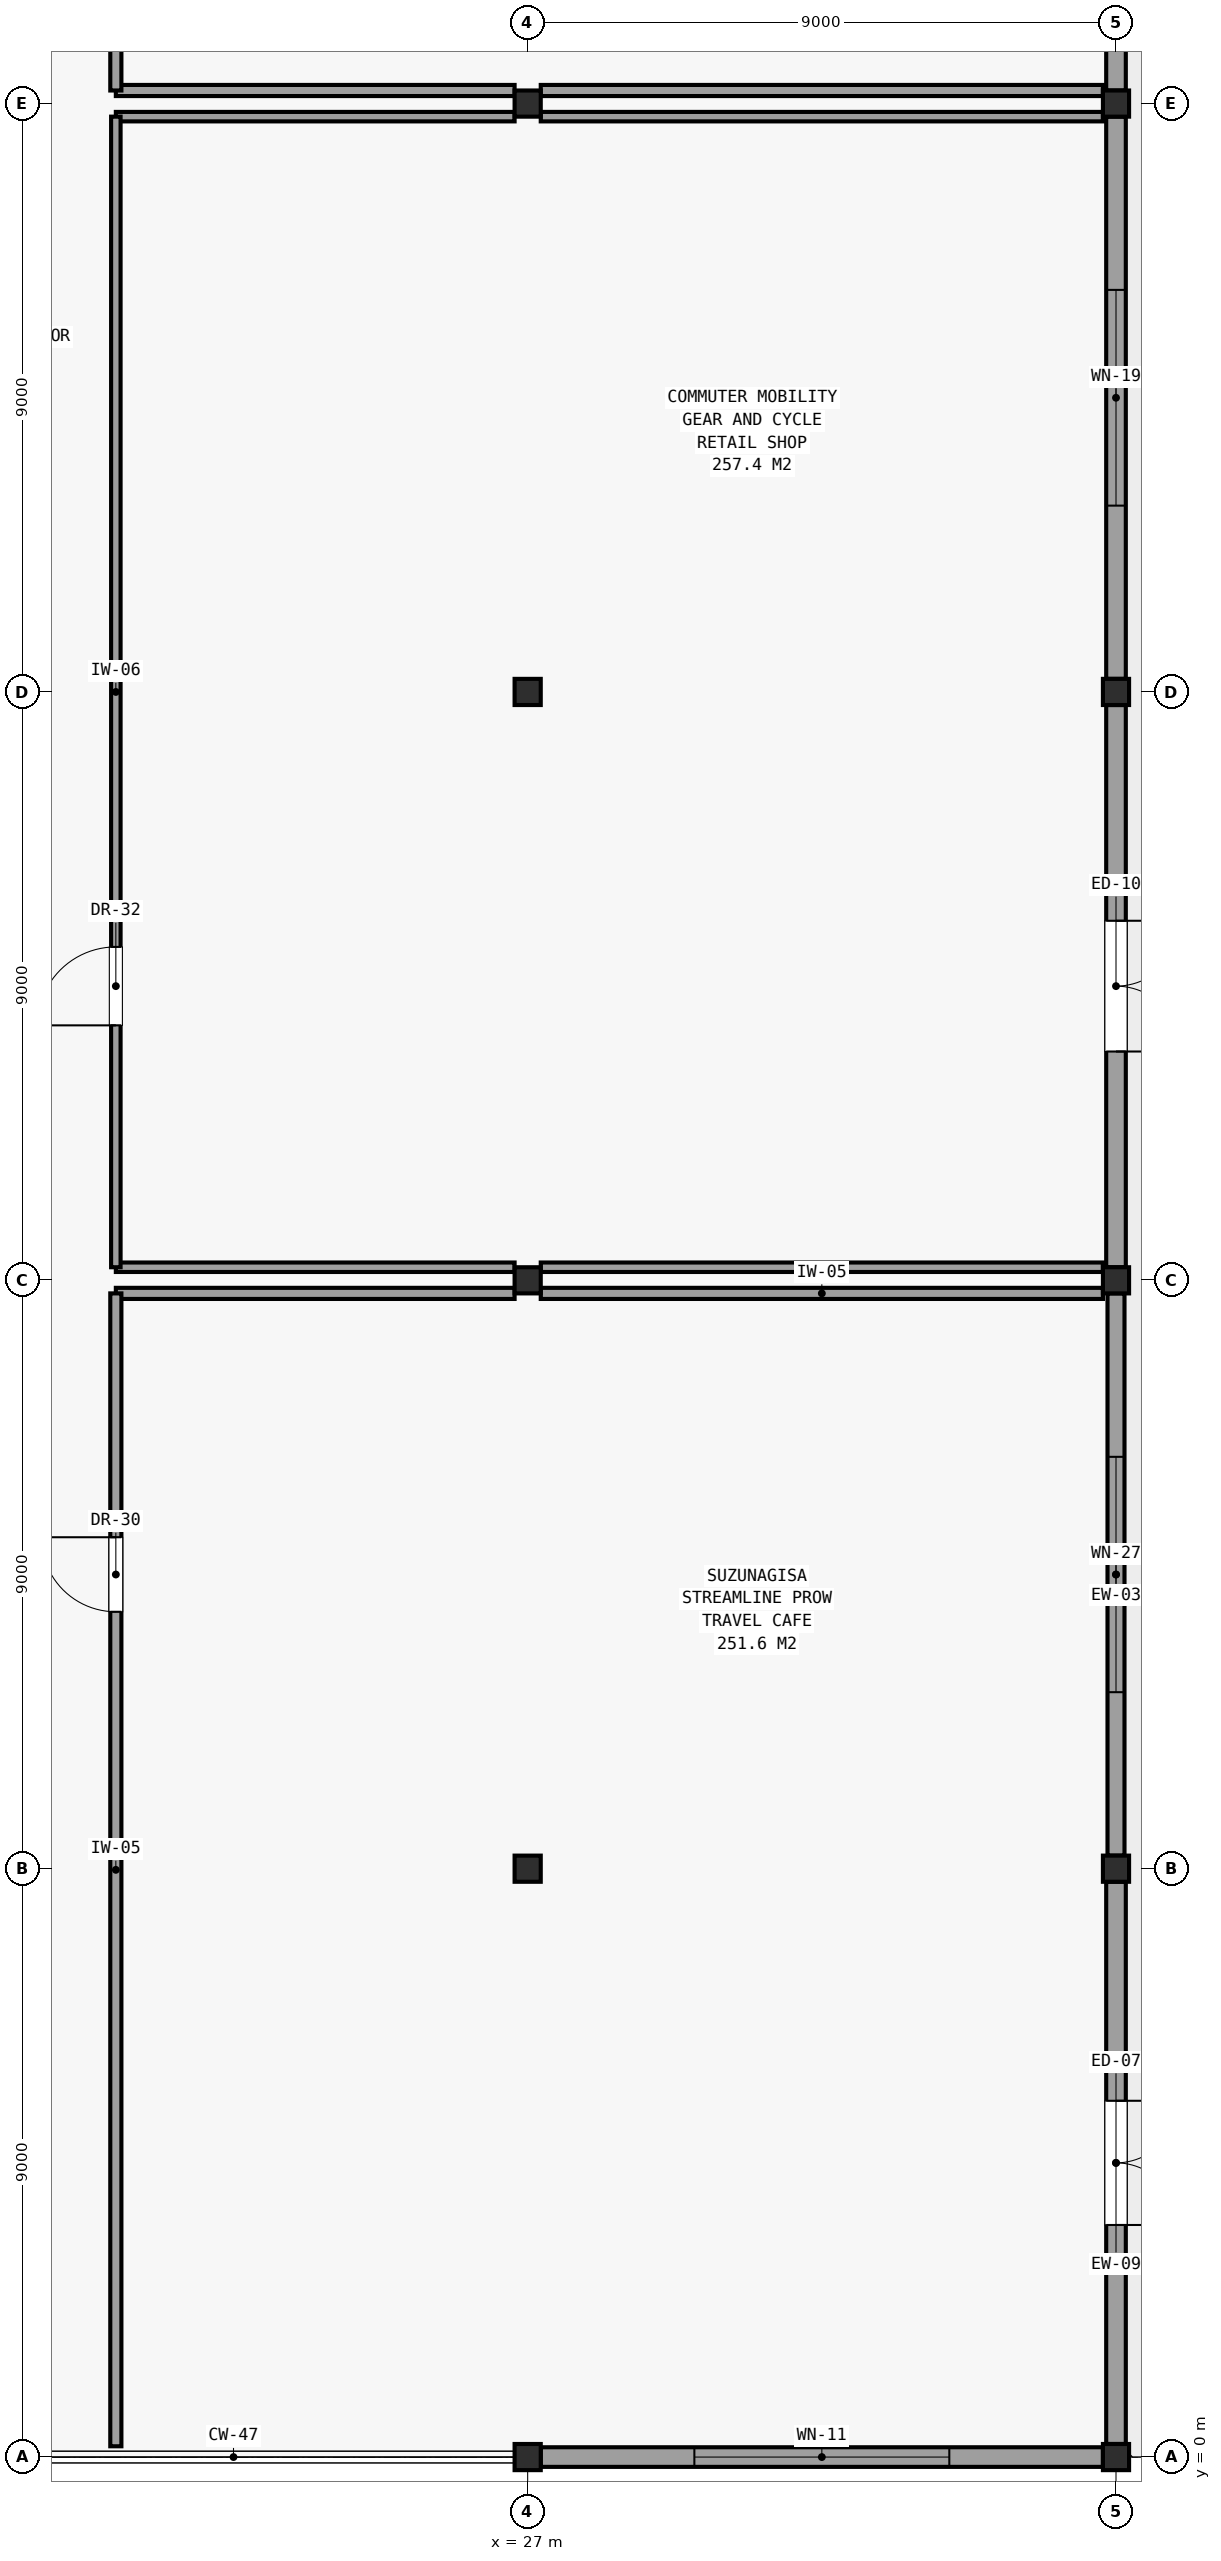
"""IFC4 building model, lengths in metres.
Left out: names, types, materials, properties, quantities, classifications, styles, units other than length and angle.
Written with IfcOpenShell. Run it as: python <this file> out.ifc"""

import sys

from ifc_helpers import new_model, si_unit, direction, frame, frame_2d, origin, origin_2d, place, context, subcontext, project, spatial, rectangle, hollow_rectangle, extrude, element, fill, save


model = new_model("IFC4")
c1 = context("Model", 3, precision=1e-05, world=origin(), true_north=direction((0.0, 1.0)))
c2 = subcontext(c1, "Body", "Model", "MODEL_VIEW")
j1 = project(units=[si_unit("LENGTHUNIT", "METRE"), si_unit("PLANEANGLEUNIT", "RADIAN")], contexts=[c1])
p1 = place(None, origin())
s1 = spatial("IfcSite", under=j1, at=p1, CompositionType="ELEMENT")
p2 = place(p1, origin())
s2 = spatial("IfcBuilding", under=s1, at=p2, CompositionType="ELEMENT")
p3 = place(p2, origin())
s3 = spatial("IfcBuildingStorey", under=s2, at=p3, CompositionType="ELEMENT", Elevation=0.0)
for number, where, z_axis, x_axis in (
    (1, (27.0, 0.0, 0.0), (0.0, 0.0, 1.0), (1.0, 0.0, 0.0)),
    (2, (27.0, 9.0, 0.0), (0.0, 0.0, 1.0), (1.0, 0.0, 0.0)),
    (3, (27.0, 18.0, 0.0), (0.0, 0.0, 1.0), (1.0, 0.0, 0.0)),
    (4, (27.0, 27.0, 0.0), (0.0, 0.0, 1.0), (1.0, 0.0, 0.0)),
    (5, (27.0, 36.0, 0.0), (0.0, 0.0, 1.0), (1.0, 0.0, 0.0)),
    (6, (36.0, 0.0, 0.0), (0.0, 0.0, 1.0), (1.0, 0.0, 0.0)),
    (7, (36.0, 9.0, 0.0), (0.0, 0.0, 1.0), (1.0, 0.0, 0.0)),
    (8, (36.0, 18.0, 0.0), (0.0, 0.0, 1.0), (1.0, 0.0, 0.0)),
    (9, (36.0, 27.0, 0.0), (0.0, 0.0, 1.0), (1.0, 0.0, 0.0)),
    (10, (36.0, 36.0, 0.0), (0.0, 0.0, 1.0), (1.0, 0.0, 0.0)),
):
    element("IfcColumn", number, at=place(p3, frame(where, z_axis=z_axis, x_axis=x_axis)), inside=s3, PredefinedType="COLUMN", context=c2, shape_type="SweptSolid", body=[
        extrude(hollow_rectangle(XDim=0.4, YDim=0.4, WallThickness=0.019, at=origin_2d()), origin(), (0.0, 0.0, 1.0), 5.1),
    ])
p4 = place(p3, frame((27.2, 0.0, 0.0), z_axis=(0.0, 0.0, 1.0), x_axis=(1.0, 0.0, 0.0)))
e11 = element("IfcWall", 11, at=p4, inside=s3, PredefinedType="SOLIDWALL", context=c2, shape_type="SweptSolid", body=[
    extrude(rectangle(XDim=8.6, YDim=0.3, at=frame_2d((4.3, 0.0))), origin(), (0.0, 0.0, 1.0), 4.362),
])
p5 = place(p4, frame((2.35, 0.0, 0.95)))
e12 = element("IfcOpeningElement", 12, at=p5, cuts=e11, PredefinedType="OPENING", context=c2, shape_type="SweptSolid", body=[
    extrude(rectangle(XDim=3.9, YDim=1.5, at=frame_2d((1.95, 0.75))), frame((0.0, 0.161, 0.0), z_axis=(0.0, -1.0, 0.0), x_axis=(1.0, 0.0, 0.0)), (0.0, 0.0, 1.0), 0.322),
])
p6 = place(p3, frame((36.0, 0.2, 0.0), z_axis=(0.0, 0.0, 1.0), x_axis=(0.0, 1.0, 0.0)))
e13 = element("IfcWall", 13, at=p6, inside=s3, PredefinedType="SOLIDWALL", context=c2, shape_type="SweptSolid", body=[
    extrude(rectangle(XDim=8.6, YDim=0.3, at=frame_2d((4.3, 0.0))), origin(), (0.0, 0.0, 1.0), 4.262),
])
p7 = place(p6, frame((5.25, 0.0, 0.0), z_axis=(0.0, 0.0, 1.0), x_axis=(-1.0, 0.0, 0.0)))
e14 = element("IfcOpeningElement", 14, at=p7, cuts=e13, PredefinedType="OPENING", context=c2, shape_type="SweptSolid", body=[
    extrude(rectangle(XDim=1.9, YDim=2.4, at=frame_2d((0.95, 1.2))), frame((0.0, 0.161, 0.0), z_axis=(0.0, -1.0, 0.0), x_axis=(1.0, 0.0, 0.0)), (0.0, 0.0, 1.0), 0.322),
])
p8 = place(p3, frame((36.0, 9.2, 0.0), z_axis=(0.0, 0.0, 1.0), x_axis=(0.0, 1.0, 0.0)))
e15 = element("IfcWall", 15, at=p8, inside=s3, PredefinedType="SOLIDWALL", context=c2, shape_type="SweptSolid", body=[
    extrude(rectangle(XDim=8.6, YDim=0.26, at=frame_2d((4.3, 0.0))), origin(), (0.0, 0.0, 1.0), 4.262),
])
p9 = place(p8, frame((2.5, 0.0, 0.95)))
e16 = element("IfcOpeningElement", 16, at=p9, cuts=e15, PredefinedType="OPENING", context=c2, shape_type="SweptSolid", body=[
    extrude(rectangle(XDim=3.6, YDim=1.5, at=frame_2d((1.8, 0.75))), frame((0.0, 0.141, 0.0), z_axis=(0.0, -1.0, 0.0), x_axis=(1.0, 0.0, 0.0)), (0.0, 0.0, 1.0), 0.282),
])
p10 = place(p3, frame((36.0, 18.2, 0.0), z_axis=(0.0, 0.0, 1.0), x_axis=(0.0, 1.0, 0.0)))
e17 = element("IfcWall", 17, at=p10, inside=s3, PredefinedType="SOLIDWALL", context=c2, shape_type="SweptSolid", body=[
    extrude(rectangle(XDim=8.6, YDim=0.3, at=frame_2d((4.3, 0.0))), origin(), (0.0, 0.0, 1.0), 4.262),
])
p11 = place(p10, frame((5.3, 0.0, 0.0), z_axis=(0.0, 0.0, 1.0), x_axis=(-1.0, 0.0, 0.0)))
e18 = element("IfcOpeningElement", 18, at=p11, cuts=e17, PredefinedType="OPENING", context=c2, shape_type="SweptSolid", body=[
    extrude(rectangle(XDim=2.0, YDim=2.5, at=frame_2d((1.0, 1.25))), frame((0.0, 0.161, 0.0), z_axis=(0.0, -1.0, 0.0), x_axis=(1.0, 0.0, 0.0)), (0.0, 0.0, 1.0), 0.322),
])
p12 = place(p3, frame((36.0, 27.2, 0.0), z_axis=(0.0, 0.0, 1.0), x_axis=(0.0, 1.0, 0.0)))
e19 = element("IfcWall", 19, at=p12, inside=s3, PredefinedType="SOLIDWALL", context=c2, shape_type="SweptSolid", body=[
    extrude(rectangle(XDim=8.6, YDim=0.3, at=frame_2d((4.3, 0.0))), origin(), (0.0, 0.0, 1.0), 4.262),
])
p13 = place(p12, frame((2.65, 0.0, 0.95)))
e20 = element("IfcOpeningElement", 20, at=p13, cuts=e19, PredefinedType="OPENING", context=c2, shape_type="SweptSolid", body=[
    extrude(rectangle(XDim=3.3, YDim=1.4, at=frame_2d((1.65, 0.7))), frame((0.0, 0.161, 0.0), z_axis=(0.0, -1.0, 0.0), x_axis=(1.0, 0.0, 0.0)), (0.0, 0.0, 1.0), 0.322),
])
p14 = place(p3, frame((36.0, 36.2, 0.0), z_axis=(0.0, 0.0, 1.0), x_axis=(0.0, 1.0, 0.0)))
e21 = element("IfcWall", 21, at=p14, inside=s3, PredefinedType="SOLIDWALL", context=c2, shape_type="SweptSolid", body=[
    extrude(rectangle(XDim=7.6, YDim=0.3, at=frame_2d((3.8, 0.0))), origin(), (0.0, 0.0, 1.0), 4.262),
])
p15 = place(p14, frame((4.7, 0.0, 0.0), z_axis=(0.0, 0.0, 1.0), x_axis=(-1.0, 0.0, 0.0)))
e22 = element("IfcOpeningElement", 22, at=p15, cuts=e21, PredefinedType="OPENING", context=c2, shape_type="SweptSolid", body=[
    extrude(rectangle(XDim=1.8, YDim=2.5, at=frame_2d((0.9, 1.25))), frame((0.0, 0.161, 0.0), z_axis=(0.0, -1.0, 0.0), x_axis=(1.0, 0.0, 0.0)), (0.0, 0.0, 1.0), 0.322),
])
p16 = place(p3, frame((20.7, 17.8, 0.0), z_axis=(0.0, 0.0, 1.0), x_axis=(1.0, 0.0, 0.0)))
e23 = element("IfcWall", 23, at=p16, inside=s3, PredefinedType="PARTITIONING", context=c2, shape_type="SweptSolid", body=[
    extrude(rectangle(XDim=6.1, YDim=0.17, at=frame_2d((3.05, 0.0))), origin(), (0.0, 0.0, 1.0), 4.262),
])
p17 = place(p3, frame((27.2, 17.8, 0.0), z_axis=(0.0, 0.0, 1.0), x_axis=(1.0, 0.0, 0.0)))
e24 = element("IfcWall", 24, at=p17, inside=s3, PredefinedType="PARTITIONING", context=c2, shape_type="SweptSolid", body=[
    extrude(rectangle(XDim=8.6, YDim=0.17, at=frame_2d((4.3, 0.0))), origin(), (0.0, 0.0, 1.0), 4.262),
])
p18 = place(p3, frame((20.7, 0.165, 0.0), z_axis=(0.0, 0.0, 1.0), x_axis=(0.0, 1.0, 0.0)))
e25 = element("IfcWall", 25, at=p18, inside=s3, PredefinedType="PARTITIONING", context=c2, shape_type="SweptSolid", body=[
    extrude(rectangle(XDim=17.635, YDim=0.17, at=frame_2d((8.817, 0.0))), origin(), (0.0, 0.0, 1.0), 4.262),
])
p19 = place(p18, frame((12.765, 0.0, 0.0)))
e26 = element("IfcOpeningElement", 26, at=p19, cuts=e25, PredefinedType="OPENING", context=c2, shape_type="SweptSolid", body=[
    extrude(rectangle(XDim=1.14, YDim=2.2, at=frame_2d((0.57, 1.1))), frame((0.0, 0.096, 0.0), z_axis=(0.0, -1.0, 0.0), x_axis=(1.0, 0.0, 0.0)), (0.0, 0.0, 1.0), 0.192),
])
p20 = place(p3, frame((20.7, 18.2, 0.0), z_axis=(0.0, 0.0, 1.0), x_axis=(1.0, 0.0, 0.0)))
e27 = element("IfcWall", 27, at=p20, inside=s3, PredefinedType="PARTITIONING", context=c2, shape_type="SweptSolid", body=[
    extrude(rectangle(XDim=6.1, YDim=0.145, at=frame_2d((3.05, 0.0))), origin(), (0.0, 0.0, 1.0), 4.262),
])
p21 = place(p3, frame((27.2, 18.2, 0.0), z_axis=(0.0, 0.0, 1.0), x_axis=(1.0, 0.0, 0.0)))
e28 = element("IfcWall", 28, at=p21, inside=s3, PredefinedType="PARTITIONING", context=c2, shape_type="SweptSolid", body=[
    extrude(rectangle(XDim=8.6, YDim=0.145, at=frame_2d((4.3, 0.0))), origin(), (0.0, 0.0, 1.0), 4.262),
])
p22 = place(p3, frame((20.7, 35.8, 0.0), z_axis=(0.0, 0.0, 1.0), x_axis=(1.0, 0.0, 0.0)))
e29 = element("IfcWall", 29, at=p22, inside=s3, PredefinedType="PARTITIONING", context=c2, shape_type="SweptSolid", body=[
    extrude(rectangle(XDim=6.1, YDim=0.145, at=frame_2d((3.05, 0.0))), origin(), (0.0, 0.0, 1.0), 4.262),
])
p23 = place(p3, frame((27.2, 35.8, 0.0), z_axis=(0.0, 0.0, 1.0), x_axis=(1.0, 0.0, 0.0)))
e30 = element("IfcWall", 30, at=p23, inside=s3, PredefinedType="PARTITIONING", context=c2, shape_type="SweptSolid", body=[
    extrude(rectangle(XDim=8.6, YDim=0.145, at=frame_2d((4.3, 0.0))), origin(), (0.0, 0.0, 1.0), 4.262),
])
p24 = place(p3, frame((20.7, 18.2, 0.0), z_axis=(0.0, 0.0, 1.0), x_axis=(0.0, 1.0, 0.0)))
e31 = element("IfcWall", 31, at=p24, inside=s3, PredefinedType="PARTITIONING", context=c2, shape_type="SweptSolid", body=[
    extrude(rectangle(XDim=17.6, YDim=0.145, at=frame_2d((8.8, 0.0))), origin(), (0.0, 0.0, 1.0), 4.262),
])
p25 = place(p24, frame((3.7, 0.0, 0.0)))
e32 = element("IfcOpeningElement", 32, at=p25, cuts=e31, PredefinedType="OPENING", context=c2, shape_type="SweptSolid", body=[
    extrude(rectangle(XDim=1.2, YDim=2.3, at=frame_2d((0.6, 1.15))), frame((0.0, 0.083, 0.0), z_axis=(0.0, -1.0, 0.0), x_axis=(1.0, 0.0, 0.0)), (0.0, 0.0, 1.0), 0.167),
])
p26 = place(p3, frame((20.7, 36.2, 0.0), z_axis=(0.0, 0.0, 1.0), x_axis=(1.0, 0.0, 0.0)))
e33 = element("IfcWall", 33, at=p26, inside=s3, PredefinedType="PARTITIONING", context=c2, shape_type="SweptSolid", body=[
    extrude(rectangle(XDim=6.1, YDim=0.17, at=frame_2d((3.05, 0.0))), origin(), (0.0, 0.0, 1.0), 4.262),
])
p27 = place(p3, frame((27.2, 36.2, 0.0), z_axis=(0.0, 0.0, 1.0), x_axis=(1.0, 0.0, 0.0)))
e34 = element("IfcWall", 34, at=p27, inside=s3, PredefinedType="PARTITIONING", context=c2, shape_type="SweptSolid", body=[
    extrude(rectangle(XDim=8.6, YDim=0.17, at=frame_2d((4.3, 0.0))), origin(), (0.0, 0.0, 1.0), 4.262),
])
p28 = place(p3, frame((20.7, 36.2, 0.0), z_axis=(0.0, 0.0, 1.0), x_axis=(0.0, 1.0, 0.0)))
e35 = element("IfcWall", 35, at=p28, inside=s3, PredefinedType="PARTITIONING", context=c2, shape_type="SweptSolid", body=[
    extrude(rectangle(XDim=7.6, YDim=0.17, at=frame_2d((3.8, 0.0))), origin(), (0.0, 0.0, 1.0), 4.262),
])
p29 = place(p28, frame((2.96, 0.0, 0.0)))
e36 = element("IfcOpeningElement", 36, at=p29, cuts=e35, PredefinedType="OPENING", context=c2, shape_type="SweptSolid", body=[
    extrude(rectangle(XDim=1.28, YDim=2.3, at=frame_2d((0.64, 1.15))), frame((0.0, 0.096, 0.0), z_axis=(0.0, -1.0, 0.0), x_axis=(1.0, 0.0, 0.0)), (0.0, 0.0, 1.0), 0.192),
])
p30 = place(p5, origin())
e37 = element("IfcWindow", 37, at=p30, inside=s3, PartitioningType="SINGLE_PANEL", PredefinedType="WINDOW", context=c2, shape_type="SweptSolid", body=[
    extrude(rectangle(XDim=3.9, YDim=1.5, at=frame_2d((1.95, 0.75))), frame((0.0, 0.03, 0.0), z_axis=(0.0, -1.0, 0.0), x_axis=(1.0, 0.0, 0.0)), (0.0, 0.0, 1.0), 0.06),
])
fill(e12, e37)
p31 = place(p7, origin())
e38 = element("IfcDoor", 38, at=p31, inside=s3, OperationType="SINGLE_SWING_LEFT", PredefinedType="DOOR", context=c2, shape_type="SweptSolid", body=[
    extrude(rectangle(XDim=1.9, YDim=2.4, at=frame_2d((0.95, 1.2))), frame((0.0, 0.025, 0.0), z_axis=(0.0, -1.0, 0.0), x_axis=(1.0, 0.0, 0.0)), (0.0, 0.0, 1.0), 0.05),
])
fill(e14, e38)
p32 = place(p9, origin())
e39 = element("IfcWindow", 39, at=p32, inside=s3, PartitioningType="SINGLE_PANEL", PredefinedType="WINDOW", context=c2, shape_type="SweptSolid", body=[
    extrude(rectangle(XDim=3.6, YDim=1.5, at=frame_2d((1.8, 0.75))), frame((0.0, 0.03, 0.0), z_axis=(0.0, -1.0, 0.0), x_axis=(1.0, 0.0, 0.0)), (0.0, 0.0, 1.0), 0.06),
])
fill(e16, e39)
p33 = place(p11, origin())
e40 = element("IfcDoor", 40, at=p33, inside=s3, OperationType="SINGLE_SWING_LEFT", PredefinedType="DOOR", context=c2, shape_type="SweptSolid", body=[
    extrude(rectangle(XDim=2.0, YDim=2.5, at=frame_2d((1.0, 1.25))), frame((0.0, 0.025, 0.0), z_axis=(0.0, -1.0, 0.0), x_axis=(1.0, 0.0, 0.0)), (0.0, 0.0, 1.0), 0.05),
])
fill(e18, e40)
p34 = place(p13, origin())
e41 = element("IfcWindow", 41, at=p34, inside=s3, PartitioningType="SINGLE_PANEL", PredefinedType="WINDOW", context=c2, shape_type="SweptSolid", body=[
    extrude(rectangle(XDim=3.3, YDim=1.4, at=frame_2d((1.65, 0.7))), frame((0.0, 0.03, 0.0), z_axis=(0.0, -1.0, 0.0), x_axis=(1.0, 0.0, 0.0)), (0.0, 0.0, 1.0), 0.06),
])
fill(e20, e41)
p35 = place(p19, origin())
e42 = element("IfcDoor", 42, at=p35, inside=s3, OperationType="SINGLE_SWING_RIGHT", PredefinedType="DOOR", context=c2, shape_type="SweptSolid", body=[
    extrude(rectangle(XDim=1.14, YDim=2.2, at=frame_2d((0.57, 1.1))), frame((0.0, 0.025, 0.0), z_axis=(0.0, -1.0, 0.0), x_axis=(1.0, 0.0, 0.0)), (0.0, 0.0, 1.0), 0.05),
])
fill(e26, e42)
p36 = place(p25, origin())
e43 = element("IfcDoor", 43, at=p36, inside=s3, OperationType="SINGLE_SWING_LEFT", PredefinedType="DOOR", context=c2, shape_type="SweptSolid", body=[
    extrude(rectangle(XDim=1.2, YDim=2.3, at=frame_2d((0.6, 1.15))), frame((0.0, 0.025, 0.0), z_axis=(0.0, -1.0, 0.0), x_axis=(1.0, 0.0, 0.0)), (0.0, 0.0, 1.0), 0.05),
])
fill(e32, e43)
save(model, sys.argv[1])
